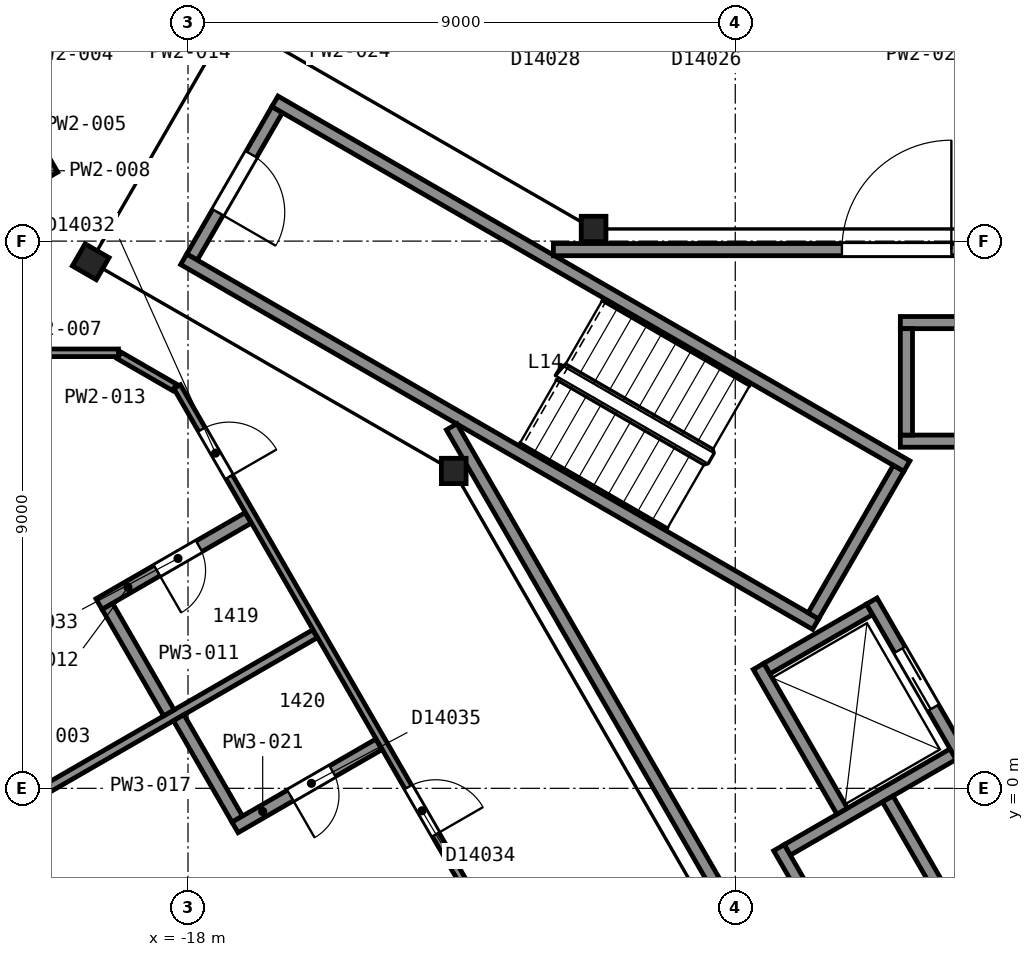
"""IFC4 building model, lengths in metres.
Left out: names, types, materials, properties, quantities, classifications, styles, units other than length and angle.
Written with IfcOpenShell. Run it as: python <this file> out.ifc"""

import sys

from ifc_helpers import new_model, si_unit, direction, frame, frame_2d, origin, origin_2d, place, context, subcontext, project, spatial, rectangle, i_section, extrude, element, fill, save


model = new_model("IFC4")
c1 = context("Model", 3, precision=1e-05, world=origin(), true_north=direction((0.0, 1.0)))
c2 = subcontext(c1, "Body", "Model", "MODEL_VIEW")
j1 = project(units=[si_unit("LENGTHUNIT", "METRE"), si_unit("PLANEANGLEUNIT", "RADIAN")], contexts=[c1])
p1 = place(None, origin())
s1 = spatial("IfcSite", under=j1, at=p1, CompositionType="ELEMENT")
p2 = place(p1, origin())
s2 = spatial("IfcBuilding", under=s1, at=p2, CompositionType="ELEMENT")
p3 = place(p2, frame((0.0, 0.0, 65.6)))
s3 = spatial("IfcBuildingStorey", under=s2, at=p3, CompositionType="ELEMENT", Elevation=65.6)
p4 = place(p3, frame((-11.33, 9.2, 0.0), z_axis=(0.0, 0.0, 1.0), x_axis=(1.0, 0.0, 0.0)))
e1 = element("IfcColumn", 1, at=p4, inside=s3, PredefinedType="COLUMN", context=c2, shape_type="SweptSolid", body=[
    extrude(i_section(OverallWidth=0.406, OverallDepth=0.417, WebThickness=0.03, FlangeThickness=0.048, FilletRadius=0.015, at=origin_2d()), origin(), (0.0, 0.0, 1.0), 3.6),
])
p5 = place(p3, frame((-19.6, 8.66, 0.0), z_axis=(0.0, 0.0, 1.0), x_axis=(0.5, 0.866025403784, 0.0)))
e2 = element("IfcColumn", 2, at=p5, inside=s3, PredefinedType="COLUMN", context=c2, shape_type="SweptSolid", body=[
    extrude(i_section(OverallWidth=0.419, OverallDepth=0.455, WebThickness=0.042, FlangeThickness=0.068, FilletRadius=0.015, at=origin_2d()), origin(), (0.0, 0.0, 1.0), 3.6),
])
p6 = place(p3, frame((-13.63, 5.22, 0.0), z_axis=(0.0, 0.0, 1.0), x_axis=(1.0, 0.0, 0.0)))
e3 = element("IfcColumn", 3, at=p6, inside=s3, PredefinedType="COLUMN", context=c2, shape_type="SweptSolid", body=[
    extrude(i_section(OverallWidth=0.406, OverallDepth=0.417, WebThickness=0.03, FlangeThickness=0.048, FilletRadius=0.015, at=origin_2d()), origin(), (0.0, 0.0, 1.0), 3.6),
])
p7 = place(p3, frame((-16.534, 11.162, 0.0), z_axis=(0.0, 0.0, 1.0), x_axis=(-0.49998411664, -0.866034573852, 0.0)))
e4 = element("IfcWall", 4, at=p7, inside=s3, PredefinedType="PARTITIONING", context=c2, shape_type="SweptSolid", body=[
    extrude(rectangle(XDim=2.8, YDim=0.2, at=frame_2d((1.4, 0.0))), origin(), (0.0, 0.0, 1.0), 3.35),
])
p8 = place(p7, frame((0.85, 0.0, 0.0)))
e5 = element("IfcOpeningElement", 5, at=p8, cuts=e4, PredefinedType="OPENING", context=c2, shape_type="SweptSolid", body=[
    extrude(rectangle(XDim=1.1, YDim=2.1, at=frame_2d((0.55, 1.05))), frame((0.0, 0.11, 0.0), z_axis=(0.0, -1.0, 0.0), x_axis=(1.0, 0.0, 0.0)), (0.0, 0.0, 1.0), 0.22),
])
for number, where, z_axis, x_axis in (
    (6, (-7.678, 2.701, 0.0), (0.0, 0.0, 1.0), (-0.866, 0.5, 0.0)),
    (7, (-6.178, 5.299, 0.0), (0.0, 0.0, 1.0), (-0.866, 0.5, 0.0)),
):
    element("IfcWall", number, at=place(p3, frame(where, z_axis=z_axis, x_axis=x_axis)), inside=s3, PredefinedType="PARTITIONING", context=c2, shape_type="SweptSolid", body=[
        extrude(rectangle(XDim=12.0, YDim=0.2, at=frame_2d((6.0, 0.0))), origin(), (0.0, 0.0, 1.0), 3.35),
    ])
p9 = place(p3, frame((-6.315, 5.262, 0.0), z_axis=(0.0, 0.0, 1.0), x_axis=(-0.500049511043, -0.865996816683, 0.0)))
e8 = element("IfcWall", 8, at=p9, inside=s3, PredefinedType="PARTITIONING", context=c2, shape_type="SweptSolid", body=[
    extrude(rectangle(XDim=2.8, YDim=0.2, at=frame_2d((1.4, 0.0))), origin(), (0.0, 0.0, 1.0), 3.35),
])
for number, where, z_axis, x_axis in (
    (9, (-6.285, 5.71, 0.0), (0.0, 0.0, 1.0), (1.0, 0.0, 0.0)),
    (10, (-6.285, 7.66, 0.0), (0.0, 0.0, 1.0), (1.0, 0.0, 0.0)),
):
    element("IfcWall", number, at=place(p3, frame(where, z_axis=z_axis, x_axis=x_axis)), inside=s3, PredefinedType="PARTITIONING", context=c2, shape_type="SweptSolid", body=[
        extrude(rectangle(XDim=2.35, YDim=0.2, at=frame_2d((1.175, 0.0))), origin(), (0.0, 0.0, 1.0), 3.6),
    ])
p10 = place(p3, frame((-8.145, -1.013, 0.0), z_axis=(0.0, 0.0, 1.0), x_axis=(0.866016494683, 0.500015430699, 0.0)))
e11 = element("IfcWall", 11, at=p10, inside=s3, PredefinedType="PARTITIONING", context=c2, shape_type="SweptSolid", body=[
    extrude(rectangle(XDim=3.15, YDim=0.2, at=frame_2d((1.575, 0.0))), origin(), (0.0, 0.0, 1.0), 3.6),
])
p11 = place(p3, frame((-8.48, 1.969, 0.0), z_axis=(0.0, 0.0, 1.0), x_axis=(0.866000020948, 0.500043961785, 0.0)))
e12 = element("IfcWall", 12, at=p11, inside=s3, PredefinedType="PARTITIONING", context=c2, shape_type="SweptSolid", body=[
    extrude(rectangle(XDim=1.95, YDim=0.2, at=frame_2d((0.975, 0.0))), origin(), (0.0, 0.0, 1.0), 3.6),
])
p12 = place(p3, frame((-6.185, 5.81, 0.0), z_axis=(0.0, 0.0, 1.0), x_axis=(0.0, 1.0, 0.0)))
e13 = element("IfcWall", 13, at=p12, inside=s3, PredefinedType="PARTITIONING", context=c2, shape_type="SweptSolid", body=[
    extrude(rectangle(XDim=1.75, YDim=0.2, at=frame_2d((0.875, 0.0))), origin(), (0.0, 0.0, 1.0), 3.6),
])
p13 = place(p3, frame((-5.28, 0.525, 0.0), z_axis=(0.0, 0.0, 1.0), x_axis=(-0.500037662692, 0.866003658127, 0.0)))
e14 = element("IfcWall", 14, at=p13, inside=s3, PredefinedType="PARTITIONING", context=c2, shape_type="SweptSolid", body=[
    extrude(rectangle(XDim=2.95, YDim=0.2, at=frame_2d((1.475, 0.0))), origin(), (0.0, 0.0, 1.0), 3.6),
])
p14 = place(p13, frame((0.925, 0.0, 0.0)))
e15 = element("IfcOpeningElement", 15, at=p14, cuts=e14, PredefinedType="OPENING", context=c2, shape_type="SweptSolid", body=[
    extrude(rectangle(XDim=1.1, YDim=2.1, at=frame_2d((0.55, 1.05))), frame((0.0, 0.11, 0.0), z_axis=(0.0, -1.0, 0.0), x_axis=(1.0, 0.0, 0.0)), (0.0, 0.0, 1.0), 0.22),
])
p15 = place(p3, frame((-5.318, -2.21, 0.0), z_axis=(0.0, 0.0, 1.0), x_axis=(-0.499938297808, 0.866061024631, 0.0)))
e16 = element("IfcWall", 16, at=p15, inside=s3, PredefinedType="PARTITIONING", context=c2, shape_type="SweptSolid", body=[
    extrude(rectangle(XDim=2.35, YDim=0.2, at=frame_2d((1.175, 0.0))), origin(), (0.0, 0.0, 1.0), 3.6),
])
p16 = place(p3, frame((-7.242, -0.376, 0.0), z_axis=(0.0, 0.0, 1.0), x_axis=(-0.499996545922, 0.866027397988, 0.0)))
e17 = element("IfcWall", 17, at=p16, inside=s3, PredefinedType="PARTITIONING", context=c2, shape_type="SweptSolid", body=[
    extrude(rectangle(XDim=2.75, YDim=0.2, at=frame_2d((1.375, 0.0))), origin(), (0.0, 0.0, 1.0), 3.6),
])
p17 = place(p3, frame((-7.006, -3.185, 0.0), z_axis=(0.0, 0.0, 1.0), x_axis=(-0.499990435942, 0.866030925526, 0.0)))
e18 = element("IfcWall", 18, at=p17, inside=s3, PredefinedType="PARTITIONING", context=c2, shape_type="SweptSolid", body=[
    extrude(rectangle(XDim=2.55, YDim=0.2, at=frame_2d((1.275, 0.0))), origin(), (0.0, 0.0, 1.0), 3.6),
])
p18 = place(p3, frame((-13.664, 5.946, 0.0), z_axis=(0.0, 0.0, 1.0), x_axis=(0.499994327219, -0.866028678941, 0.0)))
e19 = element("IfcWall", 19, at=p18, inside=s3, PredefinedType="PARTITIONING", context=c2, shape_type="SweptSolid", body=[
    extrude(rectangle(XDim=23.968, YDim=0.2, at=frame_2d((11.984, 0.0))), origin(), (0.0, 0.0, 1.0), 3.35),
])
p19 = place(p3, frame((0.263, 8.86, 0.0), z_axis=(0.0, 0.0, 1.0), x_axis=(-1.0, 0.0, 0.0)))
e20 = element("IfcWall", 20, at=p19, inside=s3, PredefinedType="PARTITIONING", context=c2, shape_type="SweptSolid", body=[
    extrude(rectangle(XDim=12.254, YDim=0.2, at=frame_2d((6.127, 0.0))), origin(), (0.0, 0.0, 1.0), 3.35),
])
p20 = place(p19, frame((5.709, 0.0, 0.0)))
e21 = element("IfcOpeningElement", 21, at=p20, cuts=e20, PredefinedType="OPENING", context=c2, shape_type="SweptSolid", body=[
    extrude(rectangle(XDim=1.8, YDim=2.1, at=frame_2d((0.9, 1.05))), frame((0.0, 0.11, 0.0), z_axis=(0.0, -1.0, 0.0), x_axis=(1.0, 0.0, 0.0)), (0.0, 0.0, 1.0), 0.22),
])
p21 = place(p3, frame((-23.26, -1.701, 0.0), z_axis=(0.0, 0.0, 1.0), x_axis=(0.866027021296, 0.499997198377, 0.0)))
e22 = element("IfcWall", 22, at=p21, inside=s3, PredefinedType="PARTITIONING", context=c2, shape_type="SweptSolid", body=[
    extrude(rectangle(XDim=8.487, YDim=0.15, at=frame_2d((4.243, 0.0))), origin(), (0.0, 0.0, 1.0), 2.613),
])
p22 = place(p3, frame((-21.132, 11.721, 0.0), z_axis=(0.0, 0.0, 1.0), x_axis=(0.500072997275, -0.865983254686, 0.0)))
e23 = element("IfcWall", 23, at=p22, inside=s3, PredefinedType="PARTITIONING", context=c2, shape_type="SweptSolid", body=[
    extrude(rectangle(XDim=1.869, YDim=0.125, at=frame_2d((0.935, 0.0))), origin(), (0.0, 0.0, 1.0), 2.613),
])
p23 = place(p3, frame((-21.032, 7.163, 0.0), z_axis=(0.0, 0.0, 1.0), x_axis=(1.0, 0.0, 0.0)))
e24 = element("IfcWall", 24, at=p23, inside=s3, PredefinedType="PARTITIONING", context=c2, shape_type="SweptSolid", body=[
    extrude(rectangle(XDim=1.888, YDim=0.125, at=frame_2d((0.944, 0.0))), origin(), (0.0, 0.0, 1.0), 2.613),
])
p24 = place(p3, frame((-19.327, 2.994, 0.0), z_axis=(0.0, 0.0, 1.0), x_axis=(0.500042536776, -0.866000843773, 0.0)))
e25 = element("IfcWall", 25, at=p24, inside=s3, PredefinedType="PARTITIONING", context=c2, shape_type="SweptSolid", body=[
    extrude(rectangle(XDim=2.025, YDim=0.2, at=frame_2d((1.012, 0.0))), origin(), (0.0, 0.0, 1.0), 2.613),
])
p25 = place(p3, frame((-17.01, 4.447, 0.0), z_axis=(0.0, 0.0, 1.0), x_axis=(-0.866033446572, -0.499986069224, 0.0)))
e26 = element("IfcWall", 26, at=p25, inside=s3, PredefinedType="PARTITIONING", context=c2, shape_type="SweptSolid", body=[
    extrude(rectangle(XDim=2.833, YDim=0.2, at=frame_2d((1.416, 0.0))), origin(), (0.0, 0.0, 1.0), 2.613),
])
p26 = place(p25, frame((0.933, 0.0, 0.0)))
e27 = element("IfcOpeningElement", 27, at=p26, cuts=e26, PredefinedType="OPENING", context=c2, shape_type="SweptSolid", body=[
    extrude(rectangle(XDim=0.8, YDim=2.1, at=frame_2d((0.4, 1.05))), frame((0.0, 0.11, 0.0), z_axis=(0.0, -1.0, 0.0), x_axis=(1.0, 0.0, 0.0)), (0.0, 0.0, 1.0), 0.22),
])
p27 = place(p3, frame((-19.132, 7.121, 0.0), z_axis=(0.0, 0.0, 1.0), x_axis=(0.865876245925, -0.500258260045, 0.0)))
e28 = element("IfcWall", 28, at=p27, inside=s3, PredefinedType="PARTITIONING", context=c2, shape_type="SweptSolid", body=[
    extrude(rectangle(XDim=1.052, YDim=0.125, at=frame_2d((0.526, 0.0))), origin(), (0.0, 0.0, 1.0), 2.613),
])
p28 = place(p3, frame((-18.153, 1.161, 0.0), z_axis=(0.0, 0.0, 1.0), x_axis=(0.499971247393, -0.866042003473, 0.0)))
e29 = element("IfcWall", 29, at=p28, inside=s3, PredefinedType="PARTITIONING", context=c2, shape_type="SweptSolid", body=[
    extrude(rectangle(XDim=1.925, YDim=0.2, at=frame_2d((0.963, 0.0))), origin(), (0.0, 0.0, 1.0), 2.613),
])
p29 = place(p3, frame((-3.766, -18.358, 0.0), z_axis=(0.0, 0.0, 1.0), x_axis=(-0.500003973642, 0.866023109589, 0.0)))
e30 = element("IfcWall", 30, at=p29, inside=s3, PredefinedType="PARTITIONING", context=c2, shape_type="SweptSolid", body=[
    extrude(rectangle(XDim=28.826, YDim=0.125, at=frame_2d((14.413, 0.0))), origin(), (0.0, 0.0, 1.0), 2.613),
])
p30 = place(p29, frame((27.114, 0.0, 0.0)))
e31 = element("IfcOpeningElement", 31, at=p30, cuts=e30, PredefinedType="OPENING", context=c2, shape_type="SweptSolid", body=[
    extrude(rectangle(XDim=0.9, YDim=2.1, at=frame_2d((0.45, 1.05))), frame((0.0, 0.073, 0.0), z_axis=(0.0, -1.0, 0.0), x_axis=(1.0, 0.0, 0.0)), (0.0, 0.0, 1.0), 0.145),
])
p31 = place(p29, frame((20.322, 0.0, 0.0)))
e32 = element("IfcOpeningElement", 32, at=p31, cuts=e30, PredefinedType="OPENING", context=c2, shape_type="SweptSolid", body=[
    extrude(rectangle(XDim=0.9, YDim=2.1, at=frame_2d((0.45, 1.05))), frame((0.0, 0.073, 0.0), z_axis=(0.0, -1.0, 0.0), x_axis=(1.0, 0.0, 0.0)), (0.0, 0.0, 1.0), 0.145),
])
p32 = place(p29, frame((17.68, 0.0, 0.0)))
e33 = element("IfcOpeningElement", 33, at=p32, cuts=e30, PredefinedType="OPENING", context=c2, shape_type="SweptSolid", body=[
    extrude(rectangle(XDim=0.9, YDim=2.1, at=frame_2d((0.45, 1.05))), frame((0.0, 0.073, 0.0), z_axis=(0.0, -1.0, 0.0), x_axis=(1.0, 0.0, 0.0)), (0.0, 0.0, 1.0), 0.145),
])
p33 = place(p29, frame((10.836, 0.0, 0.0)))
e34 = element("IfcOpeningElement", 34, at=p33, cuts=e30, PredefinedType="OPENING", context=c2, shape_type="SweptSolid", body=[
    extrude(rectangle(XDim=0.9, YDim=2.1, at=frame_2d((0.45, 1.05))), frame((0.0, 0.073, 0.0), z_axis=(0.0, -1.0, 0.0), x_axis=(1.0, 0.0, 0.0)), (0.0, 0.0, 1.0), 0.145),
])
p34 = place(p29, frame((7.342, 0.0, 0.0)))
e35 = element("IfcOpeningElement", 35, at=p34, cuts=e30, PredefinedType="OPENING", context=c2, shape_type="SweptSolid", body=[
    extrude(rectangle(XDim=0.9, YDim=2.1, at=frame_2d((0.45, 1.05))), frame((0.0, 0.073, 0.0), z_axis=(0.0, -1.0, 0.0), x_axis=(1.0, 0.0, 0.0)), (0.0, 0.0, 1.0), 0.145),
])
p35 = place(p3, frame((-17.227, -0.643, 0.0), z_axis=(0.0, 0.0, 1.0), x_axis=(0.866012976267, 0.500021524473, 0.0)))
e36 = element("IfcWall", 36, at=p35, inside=s3, PredefinedType="PARTITIONING", context=c2, shape_type="SweptSolid", body=[
    extrude(rectangle(XDim=2.732, YDim=0.2, at=frame_2d((1.366, 0.0))), origin(), (0.0, 0.0, 1.0), 2.613),
])
p36 = place(p35, frame((1.05, 0.0, 0.0)))
e37 = element("IfcOpeningElement", 37, at=p36, cuts=e36, PredefinedType="OPENING", context=c2, shape_type="SweptSolid", body=[
    extrude(rectangle(XDim=0.8, YDim=2.1, at=frame_2d((0.4, 1.05))), frame((0.0, 0.11, 0.0), z_axis=(0.0, -1.0, 0.0), x_axis=(1.0, 0.0, 0.0)), (0.0, 0.0, 1.0), 0.22),
])
p37 = place(p8, origin())
e38 = element("IfcDoor", 38, at=p37, inside=s3, OperationType="SINGLE_SWING_RIGHT", PredefinedType="DOOR", context=c2, shape_type="SweptSolid", body=[
    extrude(rectangle(XDim=1.1, YDim=2.1, at=frame_2d((0.55, 1.05))), frame((0.0, 0.025, 0.0), z_axis=(0.0, -1.0, 0.0), x_axis=(1.0, 0.0, 0.0)), (0.0, 0.0, 1.0), 0.05),
])
fill(e5, e38)
p38 = place(p14, origin())
e39 = element("IfcDoor", 39, at=p38, inside=s3, OperationType="SLIDING_TO_LEFT", PredefinedType="DOOR", context=c2, shape_type="SweptSolid", body=[
    extrude(rectangle(XDim=1.1, YDim=2.1, at=frame_2d((0.55, 1.05))), frame((0.0, 0.025, 0.0), z_axis=(0.0, -1.0, 0.0), x_axis=(1.0, 0.0, 0.0)), (0.0, 0.0, 1.0), 0.05),
])
fill(e15, e39)
p39 = place(p20, origin())
e40 = element("IfcDoor", 40, at=p39, inside=s3, OperationType="DOUBLE_DOOR_SINGLE_SWING", PredefinedType="DOOR", context=c2, shape_type="SweptSolid", body=[
    extrude(rectangle(XDim=1.8, YDim=2.1, at=frame_2d((0.9, 1.05))), frame((0.0, 0.025, 0.0), z_axis=(0.0, -1.0, 0.0), x_axis=(1.0, 0.0, 0.0)), (0.0, 0.0, 1.0), 0.05),
])
fill(e21, e40)
p40 = place(p26, origin())
e41 = element("IfcDoor", 41, at=p40, inside=s3, OperationType="SINGLE_SWING_RIGHT", PredefinedType="DOOR", context=c2, shape_type="SweptSolid", body=[
    extrude(rectangle(XDim=0.8, YDim=2.1, at=frame_2d((0.4, 1.05))), frame((0.0, 0.025, 0.0), z_axis=(0.0, -1.0, 0.0), x_axis=(1.0, 0.0, 0.0)), (0.0, 0.0, 1.0), 0.05),
])
fill(e27, e41)
p41 = place(p30, origin())
e42 = element("IfcDoor", 42, at=p41, inside=s3, OperationType="SINGLE_SWING_LEFT", PredefinedType="DOOR", context=c2, shape_type="SweptSolid", body=[
    extrude(rectangle(XDim=0.9, YDim=2.1, at=frame_2d((0.45, 1.05))), frame((0.0, 0.025, 0.0), z_axis=(0.0, -1.0, 0.0), x_axis=(1.0, 0.0, 0.0)), (0.0, 0.0, 1.0), 0.05),
])
fill(e31, e42)
p42 = place(p31, origin())
e43 = element("IfcDoor", 43, at=p42, inside=s3, OperationType="SINGLE_SWING_LEFT", PredefinedType="DOOR", context=c2, shape_type="SweptSolid", body=[
    extrude(rectangle(XDim=0.9, YDim=2.1, at=frame_2d((0.45, 1.05))), frame((0.0, 0.025, 0.0), z_axis=(0.0, -1.0, 0.0), x_axis=(1.0, 0.0, 0.0)), (0.0, 0.0, 1.0), 0.05),
])
fill(e32, e43)
p43 = place(p36, origin())
e44 = element("IfcDoor", 44, at=p43, inside=s3, OperationType="SINGLE_SWING_LEFT", PredefinedType="DOOR", context=c2, shape_type="SweptSolid", body=[
    extrude(rectangle(XDim=0.8, YDim=2.1, at=frame_2d((0.4, 1.05))), frame((0.0, 0.025, 0.0), z_axis=(0.0, -1.0, 0.0), x_axis=(1.0, 0.0, 0.0)), (0.0, 0.0, 1.0), 0.05),
])
fill(e37, e44)
save(model, sys.argv[1])
